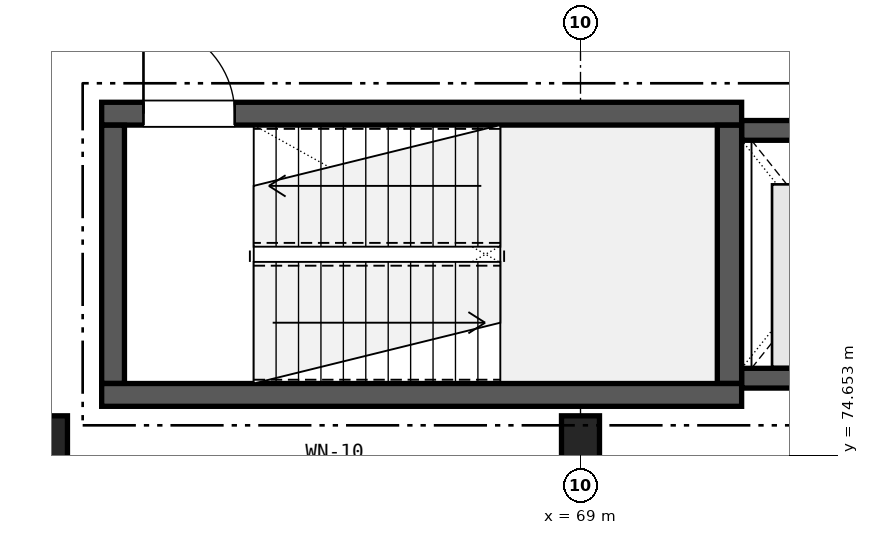
"""IFC4 building model, lengths in metres.
Left out: names, types, materials, properties, quantities, classifications, styles, units other than length and angle.
Written with IfcOpenShell. Run it as: python <this file> out.ifc"""

import sys

from ifc_helpers import new_model, si_unit, direction, frame, frame_2d, origin, origin_2d, place, context, subcontext, project, spatial, rectangle, extrude, element, fill, save


model = new_model("IFC4")
c1 = context("Model", 3, precision=1e-05, world=origin(), true_north=direction((0.0, 1.0)))
c2 = subcontext(c1, "Body", "Model", "MODEL_VIEW")
j1 = project(units=[si_unit("LENGTHUNIT", "METRE"), si_unit("PLANEANGLEUNIT", "RADIAN")], contexts=[c1])
p1 = place(None, origin())
s1 = spatial("IfcSite", under=j1, at=p1, CompositionType="ELEMENT")
p2 = place(p1, origin())
s2 = spatial("IfcBuilding", under=s1, at=p2, CompositionType="ELEMENT")
p3 = place(p2, frame((0.0, 0.0, 9.52)))
s3 = spatial("IfcBuildingStorey", under=s2, at=p3, CompositionType="ELEMENT", Elevation=9.52)
for number, where, z_axis, x_axis in (
    (1, (62.0, 74.8, 0.0), (0.0, 0.0, 1.0), (1.0, 0.0, 0.0)),
    (2, (69.0, 74.8, 0.0), (0.0, 0.0, 1.0), (1.0, 0.0, 0.0)),
):
    element("IfcColumn", number, at=place(p3, frame(where, z_axis=z_axis, x_axis=x_axis)), inside=s3, PredefinedType="COLUMN", context=c2, shape_type="SweptSolid", body=[
        extrude(rectangle(XDim=0.5, YDim=0.75, at=origin_2d()), origin(), (0.0, 0.0, 1.0), 4.08),
    ])
p4 = place(p3, frame((62.7, 75.45, 0.0), z_axis=(0.0, 0.0, 1.0), x_axis=(1.0, 0.0, 0.0)))
e3 = element("IfcWall", 3, at=p4, inside=s3, PredefinedType="SHEAR", context=c2, shape_type="SweptSolid", body=[
    extrude(rectangle(XDim=8.42, YDim=0.3, at=frame_2d((4.21, 0.0))), origin(), (0.0, 0.0, 1.0), 3.82),
])
p5 = place(p3, frame((62.7, 79.15, 0.0), z_axis=(0.0, 0.0, 1.0), x_axis=(1.0, 0.0, 0.0)))
e4 = element("IfcWall", 4, at=p5, inside=s3, PredefinedType="SHEAR", context=c2, shape_type="SweptSolid", body=[
    extrude(rectangle(XDim=8.42, YDim=0.3, at=frame_2d((4.21, 0.0))), origin(), (0.0, 0.0, 1.0), 3.82),
])
p6 = place(p5, frame((0.55, 0.0, 0.0)))
e5 = element("IfcOpeningElement", 5, at=p6, cuts=e4, PredefinedType="OPENING", context=c2, shape_type="SweptSolid", body=[
    extrude(rectangle(XDim=1.2, YDim=2.2, at=frame_2d((0.6, 1.1))), frame((0.0, 0.16, 0.0), z_axis=(0.0, -1.0, 0.0), x_axis=(1.0, 0.0, 0.0)), (0.0, 0.0, 1.0), 0.32),
])
p7 = place(p3, frame((62.85, 75.602, 0.0), z_axis=(0.0, 0.0, 1.0), x_axis=(0.0, 1.0, 0.0)))
e6 = element("IfcWall", 6, at=p7, inside=s3, PredefinedType="SHEAR", context=c2, shape_type="SweptSolid", body=[
    extrude(rectangle(XDim=3.396, YDim=0.3, at=frame_2d((1.698, 0.0))), origin(), (0.0, 0.0, 1.0), 3.82),
])
p8 = place(p3, frame((70.96, 75.602, 0.0), z_axis=(0.0, 0.0, 1.0), x_axis=(0.0, 1.0, 0.0)))
e7 = element("IfcWall", 7, at=p8, inside=s3, PredefinedType="SHEAR", context=c2, shape_type="SweptSolid", body=[
    extrude(rectangle(XDim=3.396, YDim=0.32, at=frame_2d((1.698, 0.0))), origin(), (0.0, 0.0, 1.0), 3.82),
])
p9 = place(p3, frame((71.122, 75.67, 0.0), z_axis=(0.0, 0.0, 1.0), x_axis=(1.0, 0.0, 0.0)))
e8 = element("IfcWall", 8, at=p9, inside=s3, PredefinedType="SHEAR", context=c2, shape_type="SweptSolid", body=[
    extrude(rectangle(XDim=2.658, YDim=0.26, at=frame_2d((1.329, 0.0))), origin(), (0.0, 0.0, 1.0), 3.82),
])
p10 = place(p3, frame((71.122, 78.93, 0.0), z_axis=(0.0, 0.0, 1.0), x_axis=(1.0, 0.0, 0.0)))
e9 = element("IfcWall", 9, at=p10, inside=s3, PredefinedType="SHEAR", context=c2, shape_type="SweptSolid", body=[
    extrude(rectangle(XDim=2.658, YDim=0.26, at=frame_2d((1.329, 0.0))), origin(), (0.0, 0.0, 1.0), 3.82),
])
p11 = place(p10, frame((0.679, 0.0, 0.0)))
e10 = element("IfcOpeningElement", 10, at=p11, cuts=e9, PredefinedType="OPENING", context=c2, shape_type="SweptSolid", body=[
    extrude(rectangle(XDim=1.3, YDim=2.2, at=frame_2d((0.65, 1.1))), frame((0.0, 0.14, 0.0), z_axis=(0.0, -1.0, 0.0), x_axis=(1.0, 0.0, 0.0)), (0.0, 0.0, 1.0), 0.28),
])
p12 = place(p6, origin())
e11 = element("IfcDoor", 11, at=p12, inside=s3, OperationType="SINGLE_SWING_LEFT", PredefinedType="DOOR", context=c2, shape_type="SweptSolid", body=[
    extrude(rectangle(XDim=1.2, YDim=2.2, at=frame_2d((0.6, 1.1))), frame((0.0, 0.025, 0.0), z_axis=(0.0, -1.0, 0.0), x_axis=(1.0, 0.0, 0.0)), (0.0, 0.0, 1.0), 0.05),
])
fill(e5, e11)
save(model, sys.argv[1])
